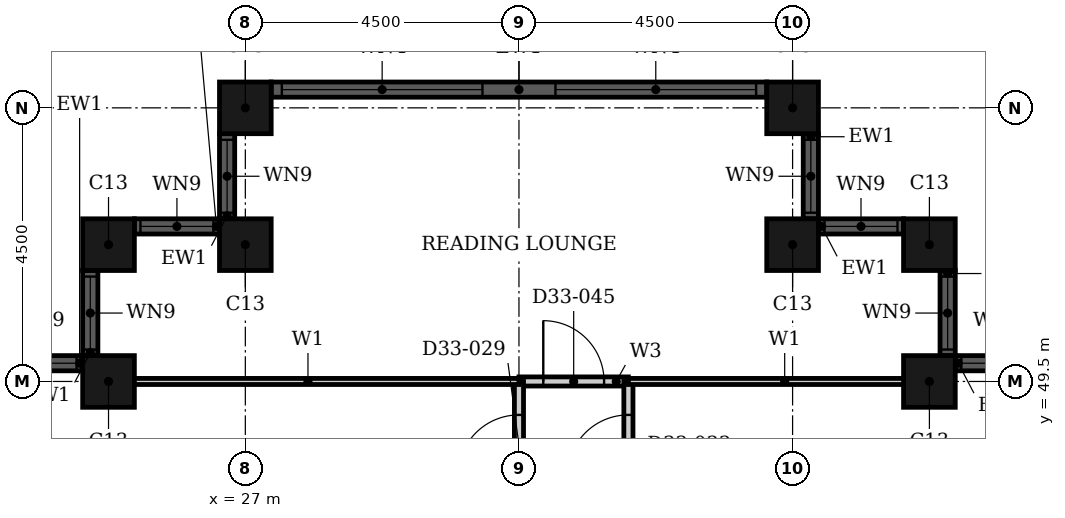
"""IFC4 building model, lengths in metres.
Left out: names, types, materials, properties, quantities, classifications, styles, units other than length and angle.
Written with IfcOpenShell. Run it as: python <this file> out.ifc"""

import sys

from ifc_helpers import new_model, si_unit, direction, frame, frame_2d, origin, origin_2d, place, context, subcontext, project, spatial, rectangle, hollow_rectangle, extrude, element, fill, save


model = new_model("IFC4")
c1 = context("Model", 3, precision=1e-05, world=origin(), true_north=direction((0.0, 1.0)))
c2 = subcontext(c1, "Body", "Model", "MODEL_VIEW")
j1 = project(units=[si_unit("LENGTHUNIT", "METRE"), si_unit("PLANEANGLEUNIT", "RADIAN")], contexts=[c1])
p1 = place(None, origin())
s1 = spatial("IfcSite", under=j1, at=p1, CompositionType="ELEMENT")
p2 = place(p1, origin())
s2 = spatial("IfcBuilding", under=s1, at=p2, CompositionType="ELEMENT")
p3 = place(p2, frame((0.0, 0.0, 133.2)))
s3 = spatial("IfcBuildingStorey", under=s2, at=p3, CompositionType="ELEMENT", Elevation=133.2)
for number, where, z_axis, x_axis in (
    (1, (38.25, 49.5, 0.0), (0.0, 0.0, 1.0), (1.0, 0.0, 0.0)),
    (2, (38.25, 51.75, 0.0), (0.0, 0.0, 1.0), (1.0, 0.0, 0.0)),
    (3, (36.0, 51.75, 0.0), (0.0, 0.0, 1.0), (1.0, 0.0, 0.0)),
    (4, (36.0, 54.0, 0.0), (0.0, 0.0, 1.0), (1.0, 0.0, 0.0)),
    (5, (27.0, 54.0, 0.0), (0.0, 0.0, 1.0), (1.0, 0.0, 0.0)),
    (6, (27.0, 51.75, 0.0), (0.0, 0.0, 1.0), (1.0, 0.0, 0.0)),
    (7, (24.75, 51.75, 0.0), (0.0, 0.0, 1.0), (1.0, 0.0, 0.0)),
    (8, (24.75, 49.5, 0.0), (0.0, 0.0, 1.0), (1.0, 0.0, 0.0)),
):
    element("IfcColumn", number, at=place(p3, frame(where, z_axis=z_axis, x_axis=x_axis)), inside=s3, PredefinedType="COLUMN", context=c2, shape_type="SweptSolid", body=[
        extrude(hollow_rectangle(XDim=0.85, YDim=0.85, WallThickness=0.026, at=origin_2d()), origin(), (0.0, 0.0, 1.0), 3.6),
    ])
p4 = place(p3, frame((40.075, 49.8, 0.0), z_axis=(0.0, 0.0, 1.0), x_axis=(-1.0, 0.0, 0.0)))
e9 = element("IfcWall", 9, at=p4, inside=s3, PredefinedType="SOLIDWALL", context=c2, shape_type="SweptSolid", body=[
    extrude(rectangle(XDim=1.4, YDim=0.25, at=frame_2d((0.7, 0.0))), origin(), (0.0, 0.0, 1.0), 3.6),
])
p5 = place(p4, frame((0.1, 0.0, 0.9)))
e10 = element("IfcOpeningElement", 10, at=p5, cuts=e9, PredefinedType="OPENING", context=c2, shape_type="SweptSolid", body=[
    extrude(rectangle(XDim=1.2, YDim=2.08, at=frame_2d((0.6, 1.04))), frame((0.0, 0.135, 0.0), z_axis=(0.0, -1.0, 0.0), x_axis=(1.0, 0.0, 0.0)), (0.0, 0.0, 1.0), 0.27),
])
p6 = place(p3, frame((38.55, 49.925, 0.0), z_axis=(0.0, 0.0, 1.0), x_axis=(0.0, 1.0, 0.0)))
e11 = element("IfcWall", 11, at=p6, inside=s3, PredefinedType="SOLIDWALL", context=c2, shape_type="SweptSolid", body=[
    extrude(rectangle(XDim=1.4, YDim=0.25, at=frame_2d((0.7, 0.0))), origin(), (0.0, 0.0, 1.0), 3.6),
])
p7 = place(p6, frame((0.1, 0.0, 0.9)))
e12 = element("IfcOpeningElement", 12, at=p7, cuts=e11, PredefinedType="OPENING", context=c2, shape_type="SweptSolid", body=[
    extrude(rectangle(XDim=1.2, YDim=2.08, at=frame_2d((0.6, 1.04))), frame((0.0, 0.135, 0.0), z_axis=(0.0, -1.0, 0.0), x_axis=(1.0, 0.0, 0.0)), (0.0, 0.0, 1.0), 0.27),
])
p8 = place(p3, frame((37.825, 52.05, 0.0), z_axis=(0.0, 0.0, 1.0), x_axis=(-1.0, 0.0, 0.0)))
e13 = element("IfcWall", 13, at=p8, inside=s3, PredefinedType="SOLIDWALL", context=c2, shape_type="SweptSolid", body=[
    extrude(rectangle(XDim=1.4, YDim=0.25, at=frame_2d((0.7, 0.0))), origin(), (0.0, 0.0, 1.0), 3.6),
])
p9 = place(p8, frame((0.1, 0.0, 0.9)))
e14 = element("IfcOpeningElement", 14, at=p9, cuts=e13, PredefinedType="OPENING", context=c2, shape_type="SweptSolid", body=[
    extrude(rectangle(XDim=1.2, YDim=2.08, at=frame_2d((0.6, 1.04))), frame((0.0, 0.135, 0.0), z_axis=(0.0, -1.0, 0.0), x_axis=(1.0, 0.0, 0.0)), (0.0, 0.0, 1.0), 0.27),
])
p10 = place(p3, frame((36.3, 52.175, 0.0), z_axis=(0.0, 0.0, 1.0), x_axis=(0.0, 1.0, 0.0)))
e15 = element("IfcWall", 15, at=p10, inside=s3, PredefinedType="SOLIDWALL", context=c2, shape_type="SweptSolid", body=[
    extrude(rectangle(XDim=1.4, YDim=0.25, at=frame_2d((0.7, 0.0))), origin(), (0.0, 0.0, 1.0), 3.6),
])
p11 = place(p10, frame((0.1, 0.0, 0.9)))
e16 = element("IfcOpeningElement", 16, at=p11, cuts=e15, PredefinedType="OPENING", context=c2, shape_type="SweptSolid", body=[
    extrude(rectangle(XDim=1.2, YDim=2.08, at=frame_2d((0.6, 1.04))), frame((0.0, 0.135, 0.0), z_axis=(0.0, -1.0, 0.0), x_axis=(1.0, 0.0, 0.0)), (0.0, 0.0, 1.0), 0.27),
])
p12 = place(p3, frame((35.575, 54.3, 0.0), z_axis=(0.0, 0.0, 1.0), x_axis=(-1.0, 0.0, 0.0)))
e17 = element("IfcWall", 17, at=p12, inside=s3, PredefinedType="SOLIDWALL", context=c2, shape_type="SweptSolid", body=[
    extrude(rectangle(XDim=8.15, YDim=0.25, at=frame_2d((4.075, 0.0))), origin(), (0.0, 0.0, 1.0), 3.6),
])
p13 = place(p12, frame((0.175, 0.0, 0.9)))
e18 = element("IfcOpeningElement", 18, at=p13, cuts=e17, PredefinedType="OPENING", context=c2, shape_type="SweptSolid", body=[
    extrude(rectangle(XDim=3.3, YDim=2.08, at=frame_2d((1.65, 1.04))), frame((0.0, 0.135, 0.0), z_axis=(0.0, -1.0, 0.0), x_axis=(1.0, 0.0, 0.0)), (0.0, 0.0, 1.0), 0.27),
])
p14 = place(p12, frame((4.675, 0.0, 0.9)))
e19 = element("IfcOpeningElement", 19, at=p14, cuts=e17, PredefinedType="OPENING", context=c2, shape_type="SweptSolid", body=[
    extrude(rectangle(XDim=3.3, YDim=2.08, at=frame_2d((1.65, 1.04))), frame((0.0, 0.135, 0.0), z_axis=(0.0, -1.0, 0.0), x_axis=(1.0, 0.0, 0.0)), (0.0, 0.0, 1.0), 0.27),
])
p15 = place(p3, frame((26.7, 53.575, 0.0), z_axis=(0.0, 0.0, 1.0), x_axis=(0.0, -1.0, 0.0)))
e20 = element("IfcWall", 20, at=p15, inside=s3, PredefinedType="SOLIDWALL", context=c2, shape_type="SweptSolid", body=[
    extrude(rectangle(XDim=1.4, YDim=0.25, at=frame_2d((0.7, 0.0))), origin(), (0.0, 0.0, 1.0), 3.6),
])
p16 = place(p15, frame((0.1, 0.0, 0.9)))
e21 = element("IfcOpeningElement", 21, at=p16, cuts=e20, PredefinedType="OPENING", context=c2, shape_type="SweptSolid", body=[
    extrude(rectangle(XDim=1.2, YDim=2.08, at=frame_2d((0.6, 1.04))), frame((0.0, 0.135, 0.0), z_axis=(0.0, -1.0, 0.0), x_axis=(1.0, 0.0, 0.0)), (0.0, 0.0, 1.0), 0.27),
])
p17 = place(p3, frame((26.575, 52.05, 0.0), z_axis=(0.0, 0.0, 1.0), x_axis=(-1.0, 0.0, 0.0)))
e22 = element("IfcWall", 22, at=p17, inside=s3, PredefinedType="SOLIDWALL", context=c2, shape_type="SweptSolid", body=[
    extrude(rectangle(XDim=1.4, YDim=0.25, at=frame_2d((0.7, 0.0))), origin(), (0.0, 0.0, 1.0), 3.6),
])
p18 = place(p17, frame((0.1, 0.0, 0.9)))
e23 = element("IfcOpeningElement", 23, at=p18, cuts=e22, PredefinedType="OPENING", context=c2, shape_type="SweptSolid", body=[
    extrude(rectangle(XDim=1.2, YDim=2.08, at=frame_2d((0.6, 1.04))), frame((0.0, 0.135, 0.0), z_axis=(0.0, -1.0, 0.0), x_axis=(1.0, 0.0, 0.0)), (0.0, 0.0, 1.0), 0.27),
])
p19 = place(p3, frame((24.45, 51.325, 0.0), z_axis=(0.0, 0.0, 1.0), x_axis=(0.0, -1.0, 0.0)))
e24 = element("IfcWall", 24, at=p19, inside=s3, PredefinedType="SOLIDWALL", context=c2, shape_type="SweptSolid", body=[
    extrude(rectangle(XDim=1.4, YDim=0.25, at=frame_2d((0.7, 0.0))), origin(), (0.0, 0.0, 1.0), 3.6),
])
p20 = place(p19, frame((0.1, 0.0, 0.9)))
e25 = element("IfcOpeningElement", 25, at=p20, cuts=e24, PredefinedType="OPENING", context=c2, shape_type="SweptSolid", body=[
    extrude(rectangle(XDim=1.2, YDim=2.08, at=frame_2d((0.6, 1.04))), frame((0.0, 0.135, 0.0), z_axis=(0.0, -1.0, 0.0), x_axis=(1.0, 0.0, 0.0)), (0.0, 0.0, 1.0), 0.27),
])
p21 = place(p3, frame((24.325, 49.8, 0.0), z_axis=(0.0, 0.0, 1.0), x_axis=(-1.0, 0.0, 0.0)))
e26 = element("IfcWall", 26, at=p21, inside=s3, PredefinedType="SOLIDWALL", context=c2, shape_type="SweptSolid", body=[
    extrude(rectangle(XDim=1.4, YDim=0.25, at=frame_2d((0.7, 0.0))), origin(), (0.0, 0.0, 1.0), 3.6),
])
p22 = place(p21, frame((0.1, 0.0, 0.9)))
e27 = element("IfcOpeningElement", 27, at=p22, cuts=e26, PredefinedType="OPENING", context=c2, shape_type="SweptSolid", body=[
    extrude(rectangle(XDim=1.2, YDim=2.08, at=frame_2d((0.6, 1.04))), frame((0.0, 0.135, 0.0), z_axis=(0.0, -1.0, 0.0), x_axis=(1.0, 0.0, 0.0)), (0.0, 0.0, 1.0), 0.27),
])
p23 = place(p3, frame((31.5, 49.5, 0.0), z_axis=(0.0, 0.0, 1.0), x_axis=(1.0, 0.0, 0.0)))
e28 = element("IfcWall", 28, at=p23, inside=s3, PredefinedType="PARTITIONING", context=c2, shape_type="SweptSolid", body=[
    extrude(rectangle(XDim=1.8, YDim=0.15, at=frame_2d((0.9, 0.0))), origin(), (0.0, 0.0, 1.0), 3.3),
])
p24 = place(p23, frame((0.4, 0.0, 0.0)))
e29 = element("IfcOpeningElement", 29, at=p24, cuts=e28, PredefinedType="OPENING", context=c2, shape_type="SweptSolid", body=[
    extrude(rectangle(XDim=1.0, YDim=2.1, at=frame_2d((0.5, 1.05))), frame((0.0, 0.085, 0.0), z_axis=(0.0, -1.0, 0.0), x_axis=(1.0, 0.0, 0.0)), (0.0, 0.0, 1.0), 0.17),
])
p25 = place(p3, frame((31.5, 33.3, 0.0), z_axis=(0.0, 0.0, 1.0), x_axis=(0.0, 1.0, 0.0)))
e30 = element("IfcWall", 30, at=p25, inside=s3, PredefinedType="PARTITIONING", context=c2, shape_type="SweptSolid", body=[
    extrude(rectangle(XDim=16.2, YDim=0.15, at=frame_2d((8.1, 0.0))), origin(), (0.0, 0.0, 1.0), 2.58),
])
p26 = place(p25, frame((10.15, 0.0, 0.0)))
e31 = element("IfcOpeningElement", 31, at=p26, cuts=e30, PredefinedType="OPENING", context=c2, shape_type="SweptSolid", body=[
    extrude(rectangle(XDim=1.0, YDim=2.1, at=frame_2d((0.5, 1.05))), frame((0.0, 0.085, 0.0), z_axis=(0.0, -1.0, 0.0), x_axis=(1.0, 0.0, 0.0)), (0.0, 0.0, 1.0), 0.17),
])
p27 = place(p25, frame((14.65, 0.0, 0.0)))
e32 = element("IfcOpeningElement", 32, at=p27, cuts=e30, PredefinedType="OPENING", context=c2, shape_type="SweptSolid", body=[
    extrude(rectangle(XDim=1.0, YDim=2.1, at=frame_2d((0.5, 1.05))), frame((0.0, 0.085, 0.0), z_axis=(0.0, -1.0, 0.0), x_axis=(1.0, 0.0, 0.0)), (0.0, 0.0, 1.0), 0.17),
])
p28 = place(p3, frame((33.3, 33.3, 0.0), z_axis=(0.0, 0.0, 1.0), x_axis=(0.0, 1.0, 0.0)))
e33 = element("IfcWall", 33, at=p28, inside=s3, PredefinedType="PARTITIONING", context=c2, shape_type="SweptSolid", body=[
    extrude(rectangle(XDim=16.2, YDim=0.15, at=frame_2d((8.1, 0.0))), origin(), (0.0, 0.0, 1.0), 3.3),
])
p29 = place(p28, frame((10.15, 0.0, 0.0)))
e34 = element("IfcOpeningElement", 34, at=p29, cuts=e33, PredefinedType="OPENING", context=c2, shape_type="SweptSolid", body=[
    extrude(rectangle(XDim=1.0, YDim=2.1, at=frame_2d((0.5, 1.05))), frame((0.0, 0.085, 0.0), z_axis=(0.0, -1.0, 0.0), x_axis=(1.0, 0.0, 0.0)), (0.0, 0.0, 1.0), 0.17),
])
p30 = place(p28, frame((14.65, 0.0, 0.0)))
e35 = element("IfcOpeningElement", 35, at=p30, cuts=e33, PredefinedType="OPENING", context=c2, shape_type="SweptSolid", body=[
    extrude(rectangle(XDim=1.0, YDim=2.1, at=frame_2d((0.5, 1.05))), frame((0.0, 0.085, 0.0), z_axis=(0.0, -1.0, 0.0), x_axis=(1.0, 0.0, 0.0)), (0.0, 0.0, 1.0), 0.17),
])
p31 = place(p3, frame((33.3, 49.5, 0.0), z_axis=(0.0, 0.0, 1.0), x_axis=(1.0, 0.0, 0.0)))
e36 = element("IfcWall", 36, at=p31, inside=s3, PredefinedType="PARTITIONING", context=c2, shape_type="SweptSolid", body=[
    extrude(rectangle(XDim=5.14, YDim=0.1, at=frame_2d((2.57, 0.0))), origin(), (0.0, 0.0, 1.0), 3.3),
])
p32 = place(p3, frame((24.56, 49.5, 0.0), z_axis=(0.0, 0.0, 1.0), x_axis=(1.0, 0.0, 0.0)))
e37 = element("IfcWall", 37, at=p32, inside=s3, PredefinedType="PARTITIONING", context=c2, shape_type="SweptSolid", body=[
    extrude(rectangle(XDim=6.94, YDim=0.1, at=frame_2d((3.47, 0.0))), origin(), (0.0, 0.0, 1.0), 3.3),
])
p33 = place(p5, origin())
e38 = element("IfcWindow", 38, at=p33, inside=s3, PartitioningType="SINGLE_PANEL", PredefinedType="WINDOW", context=c2, shape_type="SweptSolid", body=[
    extrude(rectangle(XDim=1.2, YDim=2.08, at=frame_2d((0.6, 1.04))), frame((0.0, 0.03, 0.0), z_axis=(0.0, -1.0, 0.0), x_axis=(1.0, 0.0, 0.0)), (0.0, 0.0, 1.0), 0.06),
])
fill(e10, e38)
p34 = place(p7, origin())
e39 = element("IfcWindow", 39, at=p34, inside=s3, PartitioningType="SINGLE_PANEL", PredefinedType="WINDOW", context=c2, shape_type="SweptSolid", body=[
    extrude(rectangle(XDim=1.2, YDim=2.08, at=frame_2d((0.6, 1.04))), frame((0.0, 0.03, 0.0), z_axis=(0.0, -1.0, 0.0), x_axis=(1.0, 0.0, 0.0)), (0.0, 0.0, 1.0), 0.06),
])
fill(e12, e39)
p35 = place(p9, origin())
e40 = element("IfcWindow", 40, at=p35, inside=s3, PartitioningType="SINGLE_PANEL", PredefinedType="WINDOW", context=c2, shape_type="SweptSolid", body=[
    extrude(rectangle(XDim=1.2, YDim=2.08, at=frame_2d((0.6, 1.04))), frame((0.0, 0.03, 0.0), z_axis=(0.0, -1.0, 0.0), x_axis=(1.0, 0.0, 0.0)), (0.0, 0.0, 1.0), 0.06),
])
fill(e14, e40)
p36 = place(p11, origin())
e41 = element("IfcWindow", 41, at=p36, inside=s3, PartitioningType="SINGLE_PANEL", PredefinedType="WINDOW", context=c2, shape_type="SweptSolid", body=[
    extrude(rectangle(XDim=1.2, YDim=2.08, at=frame_2d((0.6, 1.04))), frame((0.0, 0.03, 0.0), z_axis=(0.0, -1.0, 0.0), x_axis=(1.0, 0.0, 0.0)), (0.0, 0.0, 1.0), 0.06),
])
fill(e16, e41)
p37 = place(p13, origin())
e42 = element("IfcWindow", 42, at=p37, inside=s3, PartitioningType="SINGLE_PANEL", PredefinedType="WINDOW", context=c2, shape_type="SweptSolid", body=[
    extrude(rectangle(XDim=3.3, YDim=2.08, at=frame_2d((1.65, 1.04))), frame((0.0, 0.03, 0.0), z_axis=(0.0, -1.0, 0.0), x_axis=(1.0, 0.0, 0.0)), (0.0, 0.0, 1.0), 0.06),
])
fill(e18, e42)
p38 = place(p14, origin())
e43 = element("IfcWindow", 43, at=p38, inside=s3, PartitioningType="SINGLE_PANEL", PredefinedType="WINDOW", context=c2, shape_type="SweptSolid", body=[
    extrude(rectangle(XDim=3.3, YDim=2.08, at=frame_2d((1.65, 1.04))), frame((0.0, 0.03, 0.0), z_axis=(0.0, -1.0, 0.0), x_axis=(1.0, 0.0, 0.0)), (0.0, 0.0, 1.0), 0.06),
])
fill(e19, e43)
p39 = place(p16, origin())
e44 = element("IfcWindow", 44, at=p39, inside=s3, PartitioningType="SINGLE_PANEL", PredefinedType="WINDOW", context=c2, shape_type="SweptSolid", body=[
    extrude(rectangle(XDim=1.2, YDim=2.08, at=frame_2d((0.6, 1.04))), frame((0.0, 0.03, 0.0), z_axis=(0.0, -1.0, 0.0), x_axis=(1.0, 0.0, 0.0)), (0.0, 0.0, 1.0), 0.06),
])
fill(e21, e44)
p40 = place(p18, origin())
e45 = element("IfcWindow", 45, at=p40, inside=s3, PartitioningType="SINGLE_PANEL", PredefinedType="WINDOW", context=c2, shape_type="SweptSolid", body=[
    extrude(rectangle(XDim=1.2, YDim=2.08, at=frame_2d((0.6, 1.04))), frame((0.0, 0.03, 0.0), z_axis=(0.0, -1.0, 0.0), x_axis=(1.0, 0.0, 0.0)), (0.0, 0.0, 1.0), 0.06),
])
fill(e23, e45)
p41 = place(p20, origin())
e46 = element("IfcWindow", 46, at=p41, inside=s3, PartitioningType="SINGLE_PANEL", PredefinedType="WINDOW", context=c2, shape_type="SweptSolid", body=[
    extrude(rectangle(XDim=1.2, YDim=2.08, at=frame_2d((0.6, 1.04))), frame((0.0, 0.03, 0.0), z_axis=(0.0, -1.0, 0.0), x_axis=(1.0, 0.0, 0.0)), (0.0, 0.0, 1.0), 0.06),
])
fill(e25, e46)
p42 = place(p22, origin())
e47 = element("IfcWindow", 47, at=p42, inside=s3, PartitioningType="SINGLE_PANEL", PredefinedType="WINDOW", context=c2, shape_type="SweptSolid", body=[
    extrude(rectangle(XDim=1.2, YDim=2.08, at=frame_2d((0.6, 1.04))), frame((0.0, 0.03, 0.0), z_axis=(0.0, -1.0, 0.0), x_axis=(1.0, 0.0, 0.0)), (0.0, 0.0, 1.0), 0.06),
])
fill(e27, e47)
p43 = place(p27, origin())
e48 = element("IfcDoor", 48, at=p43, inside=s3, OperationType="SINGLE_SWING_RIGHT", PredefinedType="DOOR", context=c2, shape_type="SweptSolid", body=[
    extrude(rectangle(XDim=1.0, YDim=2.1, at=frame_2d((0.5, 1.05))), frame((0.0, 0.025, 0.0), z_axis=(0.0, -1.0, 0.0), x_axis=(1.0, 0.0, 0.0)), (0.0, 0.0, 1.0), 0.05),
])
fill(e32, e48)
p44 = place(p30, origin())
e49 = element("IfcDoor", 49, at=p44, inside=s3, OperationType="SINGLE_SWING_RIGHT", PredefinedType="DOOR", context=c2, shape_type="SweptSolid", body=[
    extrude(rectangle(XDim=1.0, YDim=2.1, at=frame_2d((0.5, 1.05))), frame((0.0, 0.025, 0.0), z_axis=(0.0, -1.0, 0.0), x_axis=(1.0, 0.0, 0.0)), (0.0, 0.0, 1.0), 0.05),
])
fill(e35, e49)
p45 = place(p24, origin())
e50 = element("IfcDoor", 50, at=p45, inside=s3, OperationType="SINGLE_SWING_LEFT", PredefinedType="DOOR", context=c2, shape_type="SweptSolid", body=[
    extrude(rectangle(XDim=1.0, YDim=2.1, at=frame_2d((0.5, 1.05))), frame((0.0, 0.025, 0.0), z_axis=(0.0, -1.0, 0.0), x_axis=(1.0, 0.0, 0.0)), (0.0, 0.0, 1.0), 0.05),
])
fill(e29, e50)
save(model, sys.argv[1])
